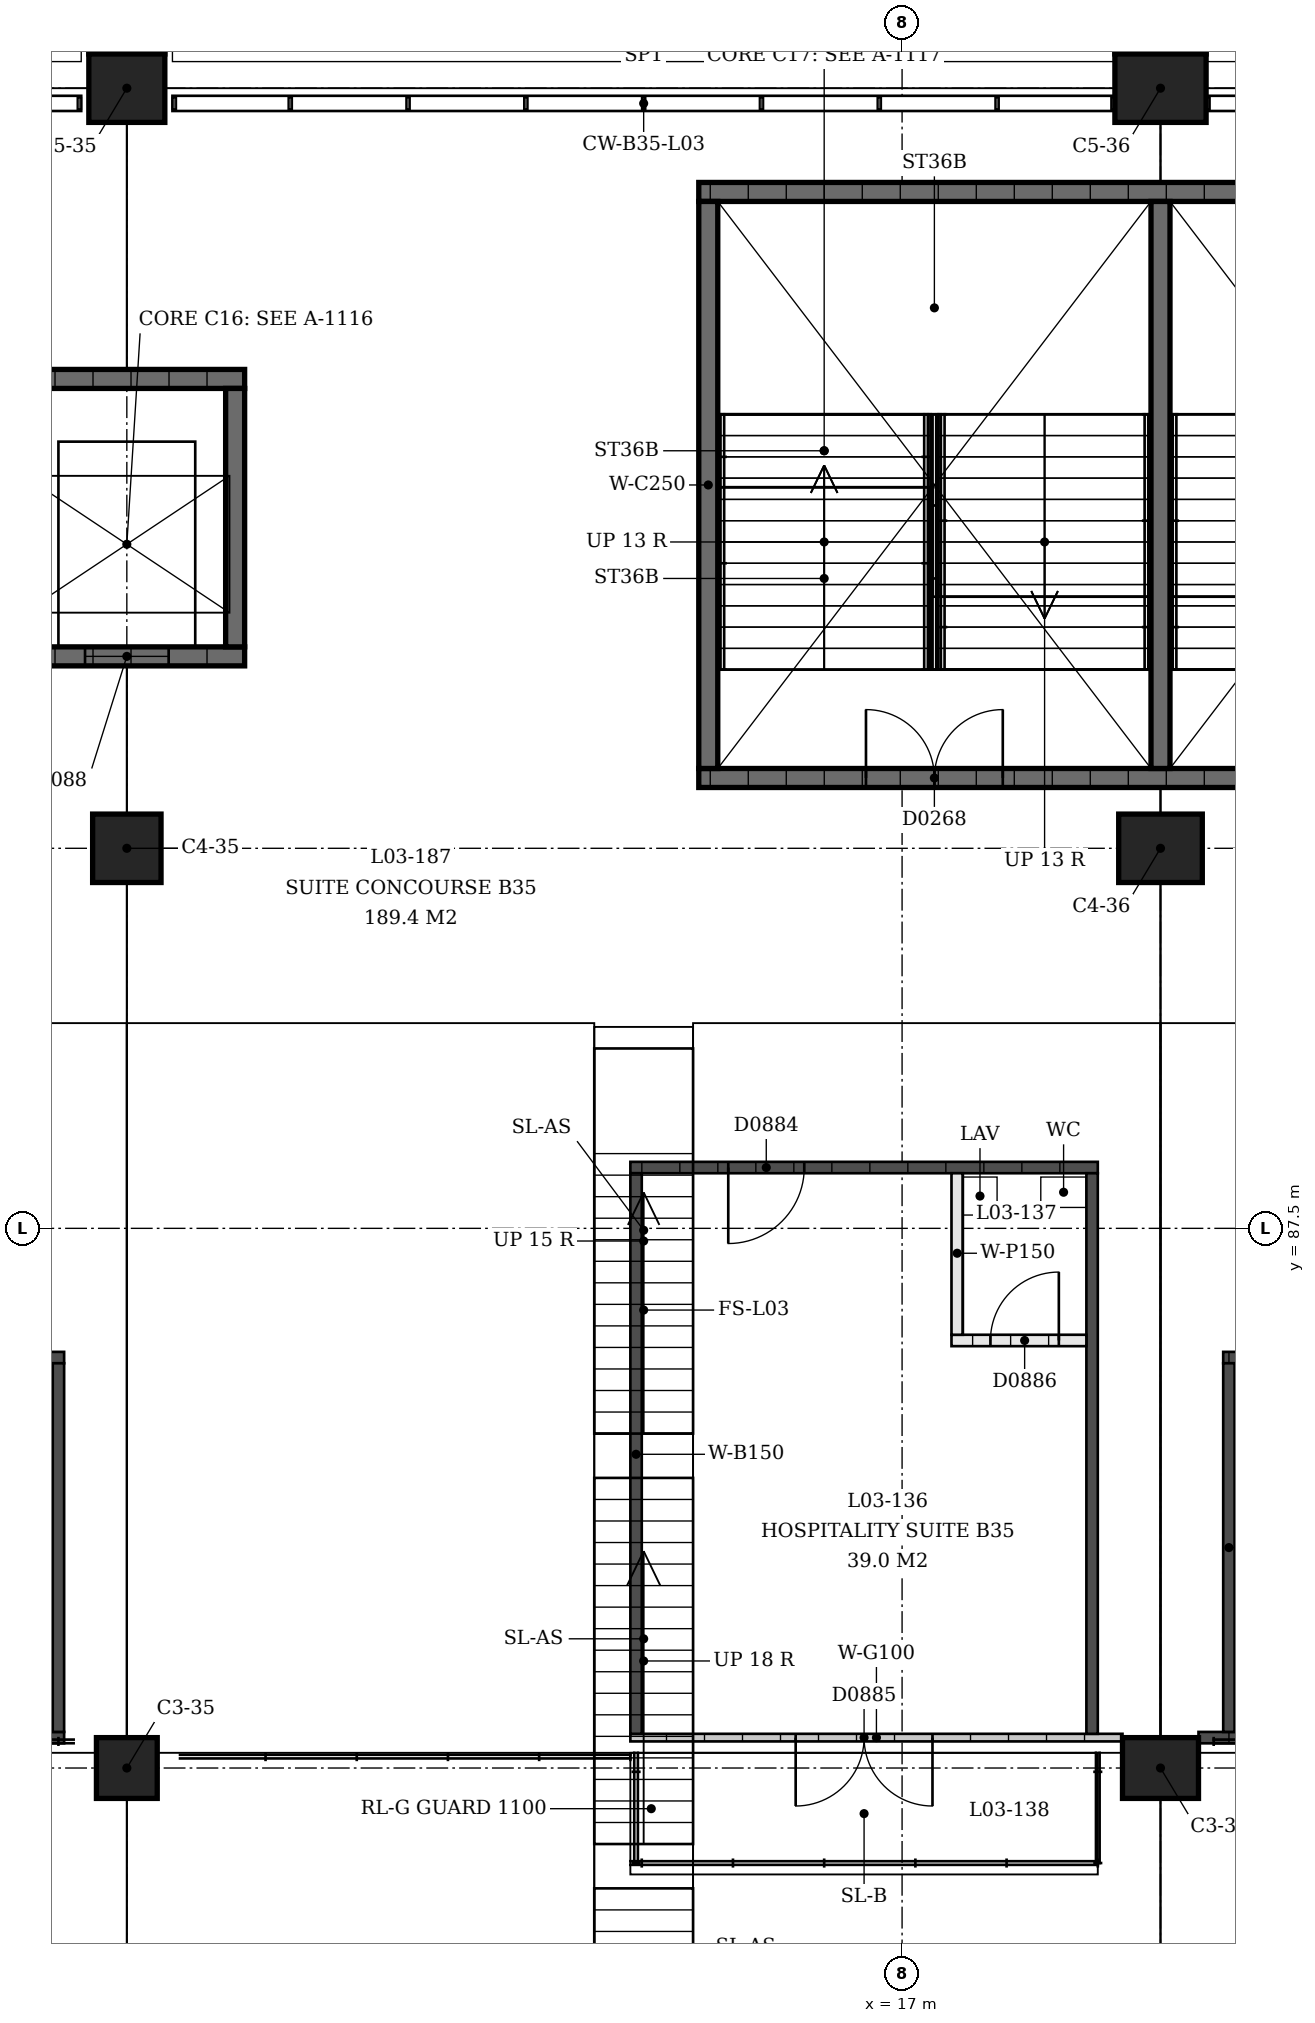
"""IFC4 building model, lengths in metres.
Left out: names, types, materials, properties, quantities, classifications, styles, units other than length and angle.
Written with IfcOpenShell. Run it as: python <this file> out.ifc"""

import sys

from ifc_helpers import new_model, si_unit, direction, frame, frame_2d, origin, origin_2d, place, context, subcontext, project, spatial, rectangle, extrude, element, fill, save


model = new_model("IFC4")
c1 = context("Model", 3, precision=1e-05, world=origin(), true_north=direction((0.0, 1.0)))
c2 = subcontext(c1, "Body", "Model", "MODEL_VIEW")
j1 = project(units=[si_unit("LENGTHUNIT", "METRE"), si_unit("PLANEANGLEUNIT", "RADIAN")], contexts=[c1])
p1 = place(None, origin())
s1 = spatial("IfcSite", under=j1, at=p1, CompositionType="ELEMENT")
p2 = place(p1, origin())
s2 = spatial("IfcBuilding", under=s1, at=p2, CompositionType="ELEMENT")
p3 = place(p2, frame((0.0, 0.0, 13.5)))
s3 = spatial("IfcBuildingStorey", under=s2, at=p3, CompositionType="ELEMENT", Elevation=13.5)
p4 = place(p3, frame((6.8, 80.4, 0.0), z_axis=(0.0, 0.0, 1.0), x_axis=(-1.0, 0.0, 0.0)))
e1 = element("IfcColumn", 1, at=p4, inside=s3, PredefinedType="COLUMN", context=c2, shape_type="SweptSolid", body=[
    extrude(rectangle(XDim=0.8, YDim=0.8, at=origin_2d()), origin(), (0.0, 0.0, 1.0), 2.033),
])
p5 = place(p3, frame((6.8, 92.5, 0.0), z_axis=(0.0, 0.0, 1.0), x_axis=(-1.0, 0.0, 0.0)))
e2 = element("IfcColumn", 2, at=p5, inside=s3, PredefinedType="COLUMN", context=c2, shape_type="SweptSolid", body=[
    extrude(rectangle(XDim=0.9, YDim=0.9, at=origin_2d()), origin(), (0.0, 0.0, 1.0), 4.5),
])
p6 = place(p3, frame((6.8, 102.5, 0.0), z_axis=(0.0, 0.0, 1.0), x_axis=(-1.0, 0.0, 0.0)))
e3 = element("IfcColumn", 3, at=p6, inside=s3, PredefinedType="COLUMN", context=c2, shape_type="SweptSolid", body=[
    extrude(rectangle(XDim=1.0, YDim=0.9, at=origin_2d()), origin(), (0.0, 0.0, 1.0), 4.5),
])
p7 = place(p3, frame((20.4, 80.4, 0.0), z_axis=(0.0, 0.0, 1.0), x_axis=(-1.0, 0.0, 0.0)))
e4 = element("IfcColumn", 4, at=p7, inside=s3, PredefinedType="COLUMN", context=c2, shape_type="SweptSolid", body=[
    extrude(rectangle(XDim=1.0, YDim=0.8, at=origin_2d()), origin(), (0.0, 0.0, 1.0), 2.033),
])
p8 = place(p3, frame((20.4, 92.5, 0.0), z_axis=(0.0, 0.0, 1.0), x_axis=(-1.0, 0.0, 0.0)))
e5 = element("IfcColumn", 5, at=p8, inside=s3, PredefinedType="COLUMN", context=c2, shape_type="SweptSolid", body=[
    extrude(rectangle(XDim=1.1, YDim=0.9, at=origin_2d()), origin(), (0.0, 0.0, 1.0), 4.5),
])
p9 = place(p3, frame((20.4, 102.5, 0.0), z_axis=(0.0, 0.0, 1.0), x_axis=(-1.0, 0.0, 0.0)))
e6 = element("IfcColumn", 6, at=p9, inside=s3, PredefinedType="COLUMN", context=c2, shape_type="SweptSolid", body=[
    extrude(rectangle(XDim=1.2, YDim=0.9, at=origin_2d()), origin(), (0.0, 0.0, 1.0), 4.5),
])
p10 = place(p3, frame((26.475, 93.425, 0.0), z_axis=(0.0, 0.0, 1.0), x_axis=(-1.0, 0.0, 0.0)))
e7 = element("IfcWall", 7, at=p10, inside=s3, PredefinedType="SHEAR", context=c2, shape_type="SweptSolid", body=[
    extrude(rectangle(XDim=12.15, YDim=0.25, at=frame_2d((6.075, 0.0))), origin(), (0.0, 0.0, 1.0), 4.09),
])
p11 = place(p10, frame((2.2, 0.0, 0.0)))
e8 = element("IfcOpeningElement", 8, at=p11, cuts=e7, PredefinedType="OPENING", context=c2, shape_type="SweptSolid", body=[
    extrude(rectangle(XDim=1.8, YDim=2.1, at=frame_2d((0.9, 1.05))), frame((0.0, 0.125, 0.0), z_axis=(0.0, -1.0, 0.0), x_axis=(1.0, 0.0, 0.0)), (0.0, 0.0, 1.0), 0.25),
])
p12 = place(p10, frame((8.15, 0.0, 0.0)))
e9 = element("IfcOpeningElement", 9, at=p12, cuts=e7, PredefinedType="OPENING", context=c2, shape_type="SweptSolid", body=[
    extrude(rectangle(XDim=1.8, YDim=2.1, at=frame_2d((0.9, 1.05))), frame((0.0, 0.125, 0.0), z_axis=(0.0, -1.0, 0.0), x_axis=(1.0, 0.0, 0.0)), (0.0, 0.0, 1.0), 0.25),
])
p13 = place(p3, frame((26.475, 101.135, 0.0), z_axis=(0.0, 0.0, 1.0), x_axis=(-1.0, 0.0, 0.0)))
e10 = element("IfcWall", 10, at=p13, inside=s3, PredefinedType="SHEAR", context=c2, shape_type="SweptSolid", body=[
    extrude(rectangle(XDim=12.15, YDim=0.25, at=frame_2d((6.075, 0.0))), origin(), (0.0, 0.0, 1.0), 4.09),
])
for number, where, z_axis, x_axis in (
    (11, (14.45, 93.55, 0.0), (0.0, 0.0, 1.0), (0.0, 1.0, 0.0)),
    (12, (20.4, 93.55, 0.0), (0.0, 0.0, 1.0), (0.0, 1.0, 0.0)),
):
    element("IfcWall", number, at=place(p3, frame(where, z_axis=z_axis, x_axis=x_axis)), inside=s3, PredefinedType="SHEAR", context=c2, shape_type="SweptSolid", body=[
        extrude(rectangle(XDim=7.46, YDim=0.25, at=frame_2d((3.73, 0.0))), origin(), (0.0, 0.0, 1.0), 4.09),
    ])
p14 = place(p3, frame((8.35, 95.025, 0.0), z_axis=(0.0, 0.0, 1.0), x_axis=(-1.0, 0.0, 0.0)))
e13 = element("IfcWall", 13, at=p14, inside=s3, PredefinedType="SHEAR", context=c2, shape_type="SweptSolid", body=[
    extrude(rectangle(XDim=3.1, YDim=0.25, at=frame_2d((1.55, 0.0))), origin(), (0.0, 0.0, 1.0), 4.09),
])
p15 = place(p14, frame((1.0, 0.0, 0.0)))
e14 = element("IfcOpeningElement", 14, at=p15, cuts=e13, PredefinedType="OPENING", context=c2, shape_type="SweptSolid", body=[
    extrude(rectangle(XDim=1.1, YDim=2.1, at=frame_2d((0.55, 1.05))), frame((0.0, 0.125, 0.0), z_axis=(0.0, -1.0, 0.0), x_axis=(1.0, 0.0, 0.0)), (0.0, 0.0, 1.0), 0.25),
])
p16 = place(p3, frame((8.35, 98.675, 0.0), z_axis=(0.0, 0.0, 1.0), x_axis=(-1.0, 0.0, 0.0)))
e15 = element("IfcWall", 15, at=p16, inside=s3, PredefinedType="SHEAR", context=c2, shape_type="SweptSolid", body=[
    extrude(rectangle(XDim=3.1, YDim=0.25, at=frame_2d((1.55, 0.0))), origin(), (0.0, 0.0, 1.0), 4.09),
])
p17 = place(p3, frame((8.225, 95.15, 0.0), z_axis=(0.0, 0.0, 1.0), x_axis=(0.0, 1.0, 0.0)))
e16 = element("IfcWall", 16, at=p17, inside=s3, PredefinedType="SHEAR", context=c2, shape_type="SweptSolid", body=[
    extrude(rectangle(XDim=3.4, YDim=0.25, at=frame_2d((1.7, 0.0))), origin(), (0.0, 0.0, 1.0), 4.09),
])
p18 = place(p3, frame((-6.3, 80.8, 0.0), z_axis=(0.0, 0.0, 1.0), x_axis=(1.0, 0.0, 0.0)))
e17 = element("IfcWall", 17, at=p18, inside=s3, PredefinedType="SOLIDWALL", context=c2, shape_type="SweptSolid", body=[
    extrude(rectangle(XDim=12.275, YDim=0.15, at=frame_2d((6.138, 0.0))), origin(), (0.0, 0.0, 1.0), 3.0),
])
p19 = place(p3, frame((-5.975, 85.8, 0.0), z_axis=(0.0, 0.0, 1.0), x_axis=(1.0, 0.0, 0.0)))
e18 = element("IfcWall", 18, at=p19, inside=s3, PredefinedType="SOLIDWALL", context=c2, shape_type="SweptSolid", body=[
    extrude(rectangle(XDim=11.95, YDim=0.15, at=frame_2d((5.975, 0.0))), origin(), (0.0, 0.0, 1.0), 3.0),
])
p20 = place(p19, frame((2.525, 0.0, 0.0)))
e19 = element("IfcOpeningElement", 19, at=p20, cuts=e18, PredefinedType="OPENING", context=c2, shape_type="SweptSolid", body=[
    extrude(rectangle(XDim=1.0, YDim=2.1, at=frame_2d((0.5, 1.05))), frame((0.0, 0.075, 0.0), z_axis=(0.0, -1.0, 0.0), x_axis=(1.0, 0.0, 0.0)), (0.0, 0.0, 1.0), 0.15),
])
p21 = place(p19, frame((8.425, 0.0, 0.0)))
e20 = element("IfcOpeningElement", 20, at=p21, cuts=e18, PredefinedType="OPENING", context=c2, shape_type="SweptSolid", body=[
    extrude(rectangle(XDim=1.0, YDim=2.1, at=frame_2d((0.5, 1.05))), frame((0.0, 0.075, 0.0), z_axis=(0.0, -1.0, 0.0), x_axis=(1.0, 0.0, 0.0)), (0.0, 0.0, 1.0), 0.15),
])
p22 = place(p3, frame((5.9, 80.875, 0.0), z_axis=(0.0, 0.0, 1.0), x_axis=(0.0, 1.0, 0.0)))
e21 = element("IfcWall", 21, at=p22, inside=s3, PredefinedType="SOLIDWALL", context=c2, shape_type="SweptSolid", body=[
    extrude(rectangle(XDim=4.85, YDim=0.15, at=frame_2d((2.425, 0.0))), origin(), (0.0, 0.0, 1.0), 3.0),
])
p23 = place(p3, frame((19.9, 80.8, 0.0), z_axis=(0.0, 0.0, 1.0), x_axis=(-1.0, 0.0, 0.0)))
e22 = element("IfcWall", 22, at=p23, inside=s3, PredefinedType="PARTITIONING", context=c2, shape_type="SweptSolid", body=[
    extrude(rectangle(XDim=6.475, YDim=0.1, at=frame_2d((3.237, 0.0))), origin(), (0.0, 0.0, 1.0), 3.0),
])
p24 = place(p23, frame((2.5, 0.0, 0.0)))
e23 = element("IfcOpeningElement", 23, at=p24, cuts=e22, PredefinedType="OPENING", context=c2, shape_type="SweptSolid", body=[
    extrude(rectangle(XDim=1.8, YDim=2.1, at=frame_2d((0.9, 1.05))), frame((0.0, 0.05, 0.0), z_axis=(0.0, -1.0, 0.0), x_axis=(1.0, 0.0, 0.0)), (0.0, 0.0, 1.0), 0.1),
])
p25 = place(p3, frame((19.575, 88.3, 0.0), z_axis=(0.0, 0.0, 1.0), x_axis=(-1.0, 0.0, 0.0)))
e24 = element("IfcWall", 24, at=p25, inside=s3, PredefinedType="SOLIDWALL", context=c2, shape_type="SweptSolid", body=[
    extrude(rectangle(XDim=6.15, YDim=0.15, at=frame_2d((3.075, 0.0))), origin(), (0.0, 0.0, 1.0), 3.0),
])
p26 = place(p25, frame((3.862, 0.0, 0.0)))
e25 = element("IfcOpeningElement", 25, at=p26, cuts=e24, PredefinedType="OPENING", context=c2, shape_type="SweptSolid", body=[
    extrude(rectangle(XDim=1.0, YDim=2.1, at=frame_2d((0.5, 1.05))), frame((0.0, 0.075, 0.0), z_axis=(0.0, -1.0, 0.0), x_axis=(1.0, 0.0, 0.0)), (0.0, 0.0, 1.0), 0.15),
])
for number, where, z_axis, x_axis in (
    (26, (19.5, 80.85, 0.0), (0.0, 0.0, 1.0), (0.0, 1.0, 0.0)),
    (27, (13.5, 80.85, 0.0), (0.0, 0.0, 1.0), (0.0, 1.0, 0.0)),
):
    element("IfcWall", number, at=place(p3, frame(where, z_axis=z_axis, x_axis=x_axis)), inside=s3, PredefinedType="SOLIDWALL", context=c2, shape_type="SweptSolid", body=[
        extrude(rectangle(XDim=7.375, YDim=0.15, at=frame_2d((3.688, 0.0))), origin(), (0.0, 0.0, 1.0), 3.0),
    ])
p27 = place(p3, frame((19.425, 86.025, 0.0), z_axis=(0.0, 0.0, 1.0), x_axis=(-1.0, 0.0, 0.0)))
e28 = element("IfcWall", 28, at=p27, inside=s3, PredefinedType="PARTITIONING", context=c2, shape_type="SweptSolid", body=[
    extrude(rectangle(XDim=1.775, YDim=0.15, at=frame_2d((0.888, 0.0))), origin(), (0.0, 0.0, 1.0), 3.0),
])
p28 = place(p27, frame((0.363, 0.0, 0.0)))
e29 = element("IfcOpeningElement", 29, at=p28, cuts=e28, PredefinedType="OPENING", context=c2, shape_type="SweptSolid", body=[
    extrude(rectangle(XDim=0.9, YDim=2.1, at=frame_2d((0.45, 1.05))), frame((0.0, 0.075, 0.0), z_axis=(0.0, -1.0, 0.0), x_axis=(1.0, 0.0, 0.0)), (0.0, 0.0, 1.0), 0.15),
])
p29 = place(p3, frame((17.725, 86.1, 0.0), z_axis=(0.0, 0.0, 1.0), x_axis=(0.0, 1.0, 0.0)))
e30 = element("IfcWall", 30, at=p29, inside=s3, PredefinedType="PARTITIONING", context=c2, shape_type="SweptSolid", body=[
    extrude(rectangle(XDim=2.125, YDim=0.15, at=frame_2d((1.062, 0.0))), origin(), (0.0, 0.0, 1.0), 3.0),
])
p30 = place(p3, frame((20.9, 80.8, 0.0), z_axis=(0.0, 0.0, 1.0), x_axis=(1.0, 0.0, 0.0)))
e31 = element("IfcWall", 31, at=p30, inside=s3, PredefinedType="SOLIDWALL", context=c2, shape_type="SweptSolid", body=[
    extrude(rectangle(XDim=12.275, YDim=0.15, at=frame_2d((6.138, 0.0))), origin(), (0.0, 0.0, 1.0), 3.0),
])
p31 = place(p3, frame((21.225, 85.8, 0.0), z_axis=(0.0, 0.0, 1.0), x_axis=(1.0, 0.0, 0.0)))
e32 = element("IfcWall", 32, at=p31, inside=s3, PredefinedType="SOLIDWALL", context=c2, shape_type="SweptSolid", body=[
    extrude(rectangle(XDim=11.95, YDim=0.15, at=frame_2d((5.975, 0.0))), origin(), (0.0, 0.0, 1.0), 3.0),
])
p32 = place(p31, frame((2.525, 0.0, 0.0)))
e33 = element("IfcOpeningElement", 33, at=p32, cuts=e32, PredefinedType="OPENING", context=c2, shape_type="SweptSolid", body=[
    extrude(rectangle(XDim=1.0, YDim=2.1, at=frame_2d((0.5, 1.05))), frame((0.0, 0.075, 0.0), z_axis=(0.0, -1.0, 0.0), x_axis=(1.0, 0.0, 0.0)), (0.0, 0.0, 1.0), 0.15),
])
p33 = place(p31, frame((8.425, 0.0, 0.0)))
e34 = element("IfcOpeningElement", 34, at=p33, cuts=e32, PredefinedType="OPENING", context=c2, shape_type="SweptSolid", body=[
    extrude(rectangle(XDim=1.0, YDim=2.1, at=frame_2d((0.5, 1.05))), frame((0.0, 0.075, 0.0), z_axis=(0.0, -1.0, 0.0), x_axis=(1.0, 0.0, 0.0)), (0.0, 0.0, 1.0), 0.15),
])
p34 = place(p3, frame((21.3, 80.875, 0.0), z_axis=(0.0, 0.0, 1.0), x_axis=(0.0, 1.0, 0.0)))
e35 = element("IfcWall", 35, at=p34, inside=s3, PredefinedType="SOLIDWALL", context=c2, shape_type="SweptSolid", body=[
    extrude(rectangle(XDim=4.85, YDim=0.15, at=frame_2d((2.425, 0.0))), origin(), (0.0, 0.0, 1.0), 3.0),
])
p35 = place(p12, origin())
e36 = element("IfcDoor", 36, at=p35, inside=s3, OperationType="DOUBLE_DOOR_SINGLE_SWING", PredefinedType="DOOR", context=c2, shape_type="SweptSolid", body=[
    extrude(rectangle(XDim=1.8, YDim=2.1, at=frame_2d((0.9, 1.05))), frame((0.0, 0.025, 0.0), z_axis=(0.0, -1.0, 0.0), x_axis=(1.0, 0.0, 0.0)), (0.0, 0.0, 1.0), 0.05),
])
fill(e9, e36)
p36 = place(p15, origin())
e37 = element("IfcDoor", 37, at=p36, inside=s3, OperationType="SLIDING_TO_LEFT", PredefinedType="DOOR", context=c2, shape_type="SweptSolid", body=[
    extrude(rectangle(XDim=1.1, YDim=2.1, at=frame_2d((0.55, 1.05))), frame((0.0, 0.025, 0.0), z_axis=(0.0, -1.0, 0.0), x_axis=(1.0, 0.0, 0.0)), (0.0, 0.0, 1.0), 0.05),
])
fill(e14, e37)
p37 = place(p26, origin())
e38 = element("IfcDoor", 38, at=p37, inside=s3, OperationType="SINGLE_SWING_LEFT", PredefinedType="DOOR", context=c2, shape_type="SweptSolid", body=[
    extrude(rectangle(XDim=1.0, YDim=2.1, at=frame_2d((0.5, 1.05))), frame((0.0, 0.025, 0.0), z_axis=(0.0, -1.0, 0.0), x_axis=(1.0, 0.0, 0.0)), (0.0, 0.0, 1.0), 0.05),
])
fill(e25, e38)
p38 = place(p24, origin())
e39 = element("IfcDoor", 39, at=p38, inside=s3, OperationType="DOUBLE_DOOR_SINGLE_SWING", PredefinedType="DOOR", context=c2, shape_type="SweptSolid", body=[
    extrude(rectangle(XDim=1.8, YDim=2.1, at=frame_2d((0.9, 1.05))), frame((0.0, 0.025, 0.0), z_axis=(0.0, -1.0, 0.0), x_axis=(1.0, 0.0, 0.0)), (0.0, 0.0, 1.0), 0.05),
])
fill(e23, e39)
p39 = place(p28, origin())
e40 = element("IfcDoor", 40, at=p39, inside=s3, OperationType="SINGLE_SWING_LEFT", PredefinedType="DOOR", context=c2, shape_type="SweptSolid", body=[
    extrude(rectangle(XDim=0.9, YDim=2.1, at=frame_2d((0.45, 1.05))), frame((0.0, 0.025, 0.0), z_axis=(0.0, -1.0, 0.0), x_axis=(1.0, 0.0, 0.0)), (0.0, 0.0, 1.0), 0.05),
])
fill(e29, e40)
save(model, sys.argv[1])
